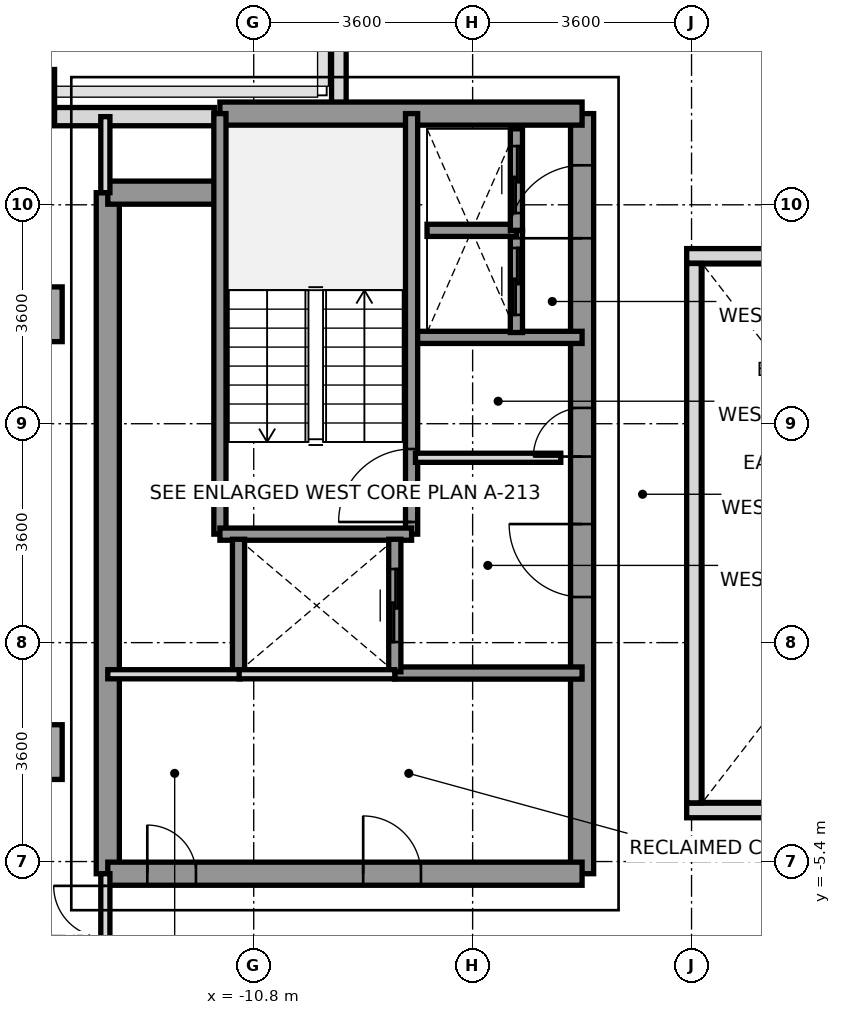
"""IFC4 building model, lengths in metres.
Left out: names, types, materials, properties, quantities, classifications, styles, units other than length and angle.
Written with IfcOpenShell. Run it as: python <this file> out.ifc"""

import sys

from ifc_helpers import new_model, si_unit, direction, frame, frame_2d, origin, origin_2d, place, context, subcontext, project, spatial, rectangle, extrude, source, transform, mapped, element, fill, save


model = new_model("IFC4")
c1 = context("Model", 3, precision=1e-05, world=origin(), true_north=direction((0.0, 1.0)))
c2 = subcontext(c1, "Body", "Model", "MODEL_VIEW")
j1 = project(units=[si_unit("LENGTHUNIT", "METRE"), si_unit("PLANEANGLEUNIT", "RADIAN")], contexts=[c1])
p1 = place(None, origin())
s1 = spatial("IfcSite", under=j1, at=p1, CompositionType="ELEMENT")
p2 = place(p1, origin())
s2 = spatial("IfcBuilding", under=s1, at=p2, CompositionType="ELEMENT")
p3 = place(p2, frame((0.0, 0.0, 211.4)))
s3 = spatial("IfcBuildingStorey", under=s2, at=p3, CompositionType="ELEMENT", Elevation=211.4)
m1 = source(origin(), c2, "Body", "SweptSolid", [
    extrude(rectangle(XDim=0.9, YDim=0.9, at=origin_2d()), origin(), (0.0, 0.0, 1.0), 3.14),
])
for number, where, z_axis, x_axis in (
    (1, (-14.4, -3.6, 0.0), (0.0, 0.0, 1.0), (1.0, 0.0, 0.0)),
    (2, (-14.4, 3.6, 0.0), (0.0, 0.0, 1.0), (1.0, 0.0, 0.0)),
):
    element("IfcColumn", number, at=place(p3, frame(where, z_axis=z_axis, x_axis=x_axis)), inside=s3, PredefinedType="COLUMN", context=c2, shape_type="MappedRepresentation", body=[
        mapped(m1, transform((0.0, 0.0, 0.0), x_axis=(1.0, 0.0, 0.0), y_axis=(0.0, 1.0, 0.0), z_axis=(0.0, 0.0, 1.0), scale=1.0)),
    ])
m2 = source(origin(), c2, "Body", "SweptSolid", [
    extrude(rectangle(XDim=0.65, YDim=0.85, at=origin_2d()), origin(), (0.0, 0.0, 1.0), 3.14),
])
p4 = place(p3, frame((-14.4, 7.2, 0.0), z_axis=(0.0, 0.0, 1.0), x_axis=(1.0, 0.0, 0.0)))
e3 = element("IfcColumn", 3, at=p4, inside=s3, PredefinedType="COLUMN", context=c2, shape_type="MappedRepresentation", body=[
    mapped(m2, transform((0.0, 0.0, 0.0), x_axis=(1.0, 0.0, 0.0), y_axis=(0.0, 1.0, 0.0), z_axis=(0.0, 0.0, 1.0), scale=1.0)),
])
p5 = place(p3, frame((-14.083, 6.85, 0.0), z_axis=(0.0, 0.0, 1.0), x_axis=(1.0, 0.0, 0.0)))
e4 = element("IfcWall", 4, at=p5, inside=s3, PredefinedType="SOLIDWALL", context=c2, shape_type="SweptSolid", body=[
    extrude(rectangle(XDim=2.635, YDim=0.3, at=frame_2d((1.317, 0.0))), origin(), (0.0, 0.0, 1.0), 3.14),
])
p6 = place(p3, frame((-9.4, 6.953, 0.0), z_axis=(0.0, 0.0, 1.0), x_axis=(0.0, 1.0, 0.0)))
e5 = element("IfcWall", 5, at=p6, inside=s3, PredefinedType="PARAPET", context=c2, shape_type="SweptSolid", body=[
    extrude(rectangle(XDim=1.594, YDim=0.24, at=frame_2d((0.797, 0.0))), origin(), (0.0, 0.0, 1.0), 1.15),
])
p7 = place(p3, frame((-13.2, -5.6, 0.0), z_axis=(0.0, 0.0, 1.0), x_axis=(0.0, 1.0, 0.0)))
e6 = element("IfcWall", 6, at=p7, inside=s3, PredefinedType="SHEAR", context=c2, shape_type="SweptSolid", body=[
    extrude(rectangle(XDim=11.2, YDim=0.38, at=frame_2d((5.6, 0.0))), origin(), (0.0, 0.0, 1.0), 3.14),
])
p8 = place(p3, frame((-5.4, -5.6, 0.0), z_axis=(0.0, 0.0, 1.0), x_axis=(0.0, 1.0, 0.0)))
e7 = element("IfcWall", 7, at=p8, inside=s3, PredefinedType="SHEAR", context=c2, shape_type="SweptSolid", body=[
    extrude(rectangle(XDim=12.5, YDim=0.38, at=frame_2d((6.25, 0.0))), origin(), (0.0, 0.0, 1.0), 3.14),
])
p9 = place(p8, frame((4.55, 0.0, 0.0)))
e8 = element("IfcOpeningElement", 8, at=p9, cuts=e7, PredefinedType="OPENING", context=c2, shape_type="SweptSolid", body=[
    extrude(rectangle(XDim=1.2, YDim=2.2, at=frame_2d((0.6, 1.1))), frame((0.0, 0.2, 0.0), z_axis=(0.0, -1.0, 0.0), x_axis=(1.0, 0.0, 0.0)), (0.0, 0.0, 1.0), 0.4),
])
p10 = place(p8, frame((10.45, 0.0, 0.0)))
e9 = element("IfcOpeningElement", 9, at=p10, cuts=e7, PredefinedType="OPENING", context=c2, shape_type="SweptSolid", body=[
    extrude(rectangle(XDim=1.2, YDim=2.2, at=frame_2d((0.6, 1.1))), frame((0.0, 0.2, 0.0), z_axis=(0.0, -1.0, 0.0), x_axis=(1.0, 0.0, 0.0)), (0.0, 0.0, 1.0), 0.4),
])
p11 = place(p8, frame((6.86, 0.0, 0.0)))
e10 = element("IfcOpeningElement", 10, at=p11, cuts=e7, PredefinedType="OPENING", context=c2, shape_type="SweptSolid", body=[
    extrude(rectangle(XDim=0.8, YDim=2.1, at=frame_2d((0.4, 1.05))), frame((0.0, 0.2, 0.0), z_axis=(0.0, -1.0, 0.0), x_axis=(1.0, 0.0, 0.0)), (0.0, 0.0, 1.0), 0.4),
])
p12 = place(p3, frame((-11.356, 6.9, 0.0), z_axis=(0.0, 0.0, 1.0), x_axis=(1.0, 0.0, 0.0)))
e11 = element("IfcWall", 11, at=p12, inside=s3, PredefinedType="SHEAR", context=c2, shape_type="SweptSolid", body=[
    extrude(rectangle(XDim=5.956, YDim=0.38, at=frame_2d((2.978, 0.0))), origin(), (0.0, 0.0, 1.0), 3.14),
])
p13 = place(p3, frame((-13.2, 5.6, 0.0), z_axis=(0.0, 0.0, 1.0), x_axis=(1.0, 0.0, 0.0)))
e12 = element("IfcWall", 12, at=p13, inside=s3, PredefinedType="SHEAR", context=c2, shape_type="SweptSolid", body=[
    extrude(rectangle(XDim=1.844, YDim=0.38, at=frame_2d((0.922, 0.0))), origin(), (0.0, 0.0, 1.0), 3.14),
])
p14 = place(p3, frame((-13.2, -5.6, 0.0), z_axis=(0.0, 0.0, 1.0), x_axis=(1.0, 0.0, 0.0)))
e13 = element("IfcWall", 13, at=p14, inside=s3, PredefinedType="SHEAR", context=c2, shape_type="SweptSolid", body=[
    extrude(rectangle(XDim=7.8, YDim=0.38, at=frame_2d((3.9, 0.0))), origin(), (0.0, 0.0, 1.0), 3.14),
])
p15 = place(p14, frame((0.65, 0.0, 0.0)))
e14 = element("IfcOpeningElement", 14, at=p15, cuts=e13, PredefinedType="OPENING", context=c2, shape_type="SweptSolid", body=[
    extrude(rectangle(XDim=0.8, YDim=2.1, at=frame_2d((0.4, 1.05))), frame((0.0, 0.2, 0.0), z_axis=(0.0, -1.0, 0.0), x_axis=(1.0, 0.0, 0.0)), (0.0, 0.0, 1.0), 0.4),
])
p16 = place(p14, frame((4.2, 0.0, 0.0)))
e15 = element("IfcOpeningElement", 15, at=p16, cuts=e13, PredefinedType="OPENING", context=c2, shape_type="SweptSolid", body=[
    extrude(rectangle(XDim=0.95, YDim=2.15, at=frame_2d((0.475, 1.075))), frame((0.0, 0.2, 0.0), z_axis=(0.0, -1.0, 0.0), x_axis=(1.0, 0.0, 0.0)), (0.0, 0.0, 1.0), 0.4),
])
p17 = place(p3, frame((-8.18, 3.22, 0.0), z_axis=(0.0, 0.0, 1.0), x_axis=(1.0, 0.0, 0.0)))
e16 = element("IfcWall", 16, at=p17, inside=s3, PredefinedType="SOLIDWALL", context=c2, shape_type="SweptSolid", body=[
    extrude(rectangle(XDim=2.78, YDim=0.2, at=frame_2d((1.39, 0.0))), origin(), (0.0, 0.0, 1.0), 3.14),
])
p18 = place(p3, frame((-8.48, -2.3, 0.0), z_axis=(0.0, 0.0, 1.0), x_axis=(1.0, 0.0, 0.0)))
e17 = element("IfcWall", 17, at=p18, inside=s3, PredefinedType="SOLIDWALL", context=c2, shape_type="SweptSolid", body=[
    extrude(rectangle(XDim=3.08, YDim=0.2, at=frame_2d((1.54, 0.0))), origin(), (0.0, 0.0, 1.0), 3.14),
])
p19 = place(p3, frame((-8.204, -0.016, 0.0), z_axis=(0.0, 0.0, 1.0), x_axis=(0.0, 1.0, 0.0)))
e18 = element("IfcWall", 18, at=p19, inside=s3, PredefinedType="SOLIDWALL", context=c2, shape_type="SweptSolid", body=[
    extrude(rectangle(XDim=6.916, YDim=0.2, at=frame_2d((3.458, 0.0))), origin(), (0.0, 0.0, 1.0), 3.14),
])
p20 = place(p19, frame((0.2, 0.0, 0.0)))
e19 = element("IfcOpeningElement", 19, at=p20, cuts=e18, PredefinedType="OPENING", context=c2, shape_type="SweptSolid", body=[
    extrude(rectangle(XDim=1.2, YDim=2.2, at=frame_2d((0.6, 1.1))), frame((0.0, 0.11, 0.0), z_axis=(0.0, -1.0, 0.0), x_axis=(1.0, 0.0, 0.0)), (0.0, 0.0, 1.0), 0.22),
])
p21 = place(p3, frame((-11.356, -0.016, 0.0), z_axis=(0.0, 0.0, 1.0), x_axis=(0.0, 1.0, 0.0)))
e20 = element("IfcWall", 20, at=p21, inside=s3, PredefinedType="SOLIDWALL", context=c2, shape_type="SweptSolid", body=[
    extrude(rectangle(XDim=6.916, YDim=0.2, at=frame_2d((3.458, 0.0))), origin(), (0.0, 0.0, 1.0), 3.14),
])
p22 = place(p3, frame((-11.356, -0.016, 0.0), z_axis=(0.0, 0.0, 1.0), x_axis=(1.0, 0.0, 0.0)))
e21 = element("IfcWall", 21, at=p22, inside=s3, PredefinedType="SOLIDWALL", context=c2, shape_type="SweptSolid", body=[
    extrude(rectangle(XDim=3.152, YDim=0.2, at=frame_2d((1.576, 0.0))), origin(), (0.0, 0.0, 1.0), 3.14),
])
p23 = place(p3, frame((-11.05, -2.28, 0.0), z_axis=(0.0, 0.0, 1.0), x_axis=(0.0, 1.0, 0.0)))
e22 = element("IfcWall", 22, at=p23, inside=s3, PredefinedType="SOLIDWALL", context=c2, shape_type="SweptSolid", body=[
    extrude(rectangle(XDim=2.18, YDim=0.2, at=frame_2d((1.09, 0.0))), origin(), (0.0, 0.0, 1.0), 3.14),
])
p24 = place(p3, frame((-8.48, -2.28, 0.0), z_axis=(0.0, 0.0, 1.0), x_axis=(0.0, 1.0, 0.0)))
e23 = element("IfcWall", 23, at=p24, inside=s3, PredefinedType="SOLIDWALL", context=c2, shape_type="SweptSolid", body=[
    extrude(rectangle(XDim=2.18, YDim=0.2, at=frame_2d((1.09, 0.0))), origin(), (0.0, 0.0, 1.0), 3.14),
])
p25 = place(p24, frame((0.49, 0.0, 0.0)))
e24 = element("IfcOpeningElement", 24, at=p25, cuts=e23, PredefinedType="OPENING", context=c2, shape_type="SweptSolid", body=[
    extrude(rectangle(XDim=1.2, YDim=2.2, at=frame_2d((0.6, 1.1))), frame((0.0, 0.11, 0.0), z_axis=(0.0, -1.0, 0.0), x_axis=(1.0, 0.0, 0.0)), (0.0, 0.0, 1.0), 0.22),
])
p26 = place(p3, frame((-6.48, 3.3, 0.0), z_axis=(0.0, 0.0, 1.0), x_axis=(0.0, 1.0, 0.0)))
e25 = element("IfcWall", 25, at=p26, inside=s3, PredefinedType="SOLIDWALL", context=c2, shape_type="SweptSolid", body=[
    extrude(rectangle(XDim=1.68, YDim=0.2, at=frame_2d((0.84, 0.0))), origin(), (0.0, 0.0, 1.0), 3.14),
])
p27 = place(p26, frame((0.29, 0.0, 0.0)))
e26 = element("IfcOpeningElement", 26, at=p27, cuts=e25, PredefinedType="OPENING", context=c2, shape_type="SweptSolid", body=[
    extrude(rectangle(XDim=1.1, YDim=2.2, at=frame_2d((0.55, 1.1))), frame((0.0, 0.11, 0.0), z_axis=(0.0, -1.0, 0.0), x_axis=(1.0, 0.0, 0.0)), (0.0, 0.0, 1.0), 0.22),
])
p28 = place(p3, frame((-7.95, 4.98, 0.0), z_axis=(0.0, 0.0, 1.0), x_axis=(1.0, 0.0, 0.0)))
e27 = element("IfcWall", 27, at=p28, inside=s3, PredefinedType="SOLIDWALL", context=c2, shape_type="SweptSolid", body=[
    extrude(rectangle(XDim=1.47, YDim=0.2, at=frame_2d((0.735, 0.0))), origin(), (0.0, 0.0, 1.0), 3.14),
])
p29 = place(p3, frame((-6.48, 4.98, 0.0), z_axis=(0.0, 0.0, 1.0), x_axis=(0.0, 1.0, 0.0)))
e28 = element("IfcWall", 28, at=p29, inside=s3, PredefinedType="SOLIDWALL", context=c2, shape_type="SweptSolid", body=[
    extrude(rectangle(XDim=1.67, YDim=0.2, at=frame_2d((0.835, 0.0))), origin(), (0.0, 0.0, 1.0), 3.14),
])
p30 = place(p29, frame((0.285, 0.0, 0.0)))
e29 = element("IfcOpeningElement", 29, at=p30, cuts=e28, PredefinedType="OPENING", context=c2, shape_type="SweptSolid", body=[
    extrude(rectangle(XDim=1.1, YDim=2.2, at=frame_2d((0.55, 1.1))), frame((0.0, 0.11, 0.0), z_axis=(0.0, -1.0, 0.0), x_axis=(1.0, 0.0, 0.0)), (0.0, 0.0, 1.0), 0.22),
])
p31 = place(p3, frame((-8.14, 1.24, 0.0), z_axis=(0.0, 0.0, 1.0), x_axis=(1.0, 0.0, 0.0)))
e30 = element("IfcWall", 30, at=p31, inside=s3, PredefinedType="PARTITIONING", context=c2, shape_type="SweptSolid", body=[
    extrude(rectangle(XDim=2.39, YDim=0.15, at=frame_2d((1.195, 0.0))), origin(), (0.0, 0.0, 1.0), 2.24),
])
p32 = place(p3, frame((-13.2, -2.32, 0.0), z_axis=(0.0, 0.0, 1.0), x_axis=(1.0, 0.0, 0.0)))
e31 = element("IfcWall", 31, at=p32, inside=s3, PredefinedType="PARTITIONING", context=c2, shape_type="SweptSolid", body=[
    extrude(rectangle(XDim=2.18, YDim=0.15, at=frame_2d((1.09, 0.0))), origin(), (0.0, 0.0, 1.0), 3.14),
])
p33 = place(p3, frame((-11.04, -2.32, 0.0), z_axis=(0.0, 0.0, 1.0), x_axis=(1.0, 0.0, 0.0)))
e32 = element("IfcWall", 32, at=p33, inside=s3, PredefinedType="PARTITIONING", context=c2, shape_type="SweptSolid", body=[
    extrude(rectangle(XDim=2.56, YDim=0.15, at=frame_2d((1.28, 0.0))), origin(), (0.0, 0.0, 1.0), 3.14),
])
p34 = place(p3, frame((-13.24, 5.6, 0.0), z_axis=(0.0, 0.0, 1.0), x_axis=(0.0, 1.0, 0.0)))
e33 = element("IfcWall", 33, at=p34, inside=s3, PredefinedType="PARTITIONING", context=c2, shape_type="SweptSolid", body=[
    extrude(rectangle(XDim=1.25, YDim=0.15, at=frame_2d((0.625, 0.0))), origin(), (0.0, 0.0, 1.0), 3.14),
])
p35 = place(p3, frame((-13.24, -6.85, 0.0), z_axis=(0.0, 0.0, 1.0), x_axis=(0.0, 1.0, 0.0)))
e34 = element("IfcWall", 34, at=p35, inside=s3, PredefinedType="PARTITIONING", context=c2, shape_type="SweptSolid", body=[
    extrude(rectangle(XDim=1.25, YDim=0.15, at=frame_2d((0.625, 0.0))), origin(), (0.0, 0.0, 1.0), 3.14),
])
p36 = place(p35, frame((0.2, 0.0, 0.0)))
e35 = element("IfcOpeningElement", 35, at=p36, cuts=e34, PredefinedType="OPENING", context=c2, shape_type="SweptSolid", body=[
    extrude(rectangle(XDim=0.85, YDim=2.1, at=frame_2d((0.425, 1.05))), frame((0.0, 0.085, 0.0), z_axis=(0.0, -1.0, 0.0), x_axis=(1.0, 0.0, 0.0)), (0.0, 0.0, 1.0), 0.17),
])
for number, where, z_axis, x_axis in (
    (36, (-3.68, -4.56, 0.0), (0.0, 0.0, 1.0), (1.0, 0.0, 0.0)),
    (37, (-3.68, 4.56, 0.0), (0.0, 0.0, 1.0), (1.0, 0.0, 0.0)),
):
    element("IfcWall", number, at=place(p3, frame(where, z_axis=z_axis, x_axis=x_axis)), inside=s3, PredefinedType="PARAPET", context=c2, shape_type="SweptSolid", body=[
        extrude(rectangle(XDim=7.36, YDim=0.24, at=frame_2d((3.68, 0.0))), origin(), (0.0, 0.0, 1.0), 1.15),
    ])
p37 = place(p3, frame((-3.56, -4.435, 0.0), z_axis=(0.0, 0.0, 1.0), x_axis=(0.0, 1.0, 0.0)))
e38 = element("IfcWall", 38, at=p37, inside=s3, PredefinedType="PARAPET", context=c2, shape_type="SweptSolid", body=[
    extrude(rectangle(XDim=8.87, YDim=0.24, at=frame_2d((4.435, 0.0))), origin(), (0.0, 0.0, 1.0), 1.15),
])
m3 = source(origin(), c2, "Body", "SweptSolid", [
    extrude(rectangle(XDim=1.2, YDim=2.2, at=frame_2d((0.6, 1.1))), frame((0.0, 0.025, 0.0), z_axis=(0.0, -1.0, 0.0), x_axis=(1.0, 0.0, 0.0)), (0.0, 0.0, 1.0), 0.05),
])
p38 = place(p20, origin())
e39 = element("IfcDoor", 39, at=p38, inside=s3, OperationType="SINGLE_SWING_LEFT", PredefinedType="DOOR", context=c2, shape_type="MappedRepresentation", body=[
    mapped(m3, transform((0.0, 0.0, 0.0), x_axis=(1.0, 0.0, 0.0), y_axis=(0.0, 1.0, 0.0), z_axis=(0.0, 0.0, 1.0), scale=1.0)),
])
fill(e19, e39)
p39 = place(p9, origin())
e40 = element("IfcDoor", 40, at=p39, inside=s3, OperationType="SINGLE_SWING_RIGHT", PredefinedType="DOOR", context=c2, shape_type="MappedRepresentation", body=[
    mapped(m3, transform((0.0, 0.0, 0.0), x_axis=(1.0, 0.0, 0.0), y_axis=(0.0, 1.0, 0.0), z_axis=(0.0, 0.0, 1.0), scale=1.0)),
])
fill(e8, e40)
p40 = place(p10, origin())
e41 = element("IfcDoor", 41, at=p40, inside=s3, OperationType="SINGLE_SWING_LEFT", PredefinedType="DOOR", context=c2, shape_type="MappedRepresentation", body=[
    mapped(m3, transform((0.0, 0.0, 0.0), x_axis=(1.0, 0.0, 0.0), y_axis=(0.0, 1.0, 0.0), z_axis=(0.0, 0.0, 1.0), scale=1.0)),
])
fill(e9, e41)
m4 = source(origin(), c2, "Body", "SweptSolid", [
    extrude(rectangle(XDim=0.8, YDim=2.1, at=frame_2d((0.4, 1.05))), frame((0.0, 0.025, 0.0), z_axis=(0.0, -1.0, 0.0), x_axis=(1.0, 0.0, 0.0)), (0.0, 0.0, 1.0), 0.05),
])
p41 = place(p11, origin())
e42 = element("IfcDoor", 42, at=p41, inside=s3, OperationType="SINGLE_SWING_LEFT", PredefinedType="DOOR", context=c2, shape_type="MappedRepresentation", body=[
    mapped(m4, transform((0.0, 0.0, 0.0), x_axis=(1.0, 0.0, 0.0), y_axis=(0.0, 1.0, 0.0), z_axis=(0.0, 0.0, 1.0), scale=1.0)),
])
fill(e10, e42)
p42 = place(p15, origin())
e43 = element("IfcDoor", 43, at=p42, inside=s3, OperationType="SINGLE_SWING_LEFT", PredefinedType="DOOR", context=c2, shape_type="MappedRepresentation", body=[
    mapped(m4, transform((0.0, 0.0, 0.0), x_axis=(1.0, 0.0, 0.0), y_axis=(0.0, 1.0, 0.0), z_axis=(0.0, 0.0, 1.0), scale=1.0)),
])
fill(e14, e43)
m5 = source(origin(), c2, "Body", "SweptSolid", [
    extrude(rectangle(XDim=0.95, YDim=2.15, at=frame_2d((0.475, 1.075))), frame((0.0, 0.025, 0.0), z_axis=(0.0, -1.0, 0.0), x_axis=(1.0, 0.0, 0.0)), (0.0, 0.0, 1.0), 0.05),
])
p43 = place(p16, origin())
e44 = element("IfcDoor", 44, at=p43, inside=s3, OperationType="SINGLE_SWING_LEFT", PredefinedType="DOOR", context=c2, shape_type="MappedRepresentation", body=[
    mapped(m5, transform((0.0, 0.0, 0.0), x_axis=(1.0, 0.0, 0.0), y_axis=(0.0, 1.0, 0.0), z_axis=(0.0, 0.0, 1.0), scale=1.0)),
])
fill(e15, e44)
p44 = place(p25, origin())
e45 = element("IfcDoor", 45, at=p44, inside=s3, OperationType="SLIDING_TO_RIGHT", PredefinedType="DOOR", context=c2, shape_type="MappedRepresentation", body=[
    mapped(m3, transform((0.0, 0.0, 0.0), x_axis=(1.0, 0.0, 0.0), y_axis=(0.0, 1.0, 0.0), z_axis=(0.0, 0.0, 1.0), scale=1.0)),
])
fill(e24, e45)
m6 = source(origin(), c2, "Body", "SweptSolid", [
    extrude(rectangle(XDim=1.1, YDim=2.2, at=frame_2d((0.55, 1.1))), frame((0.0, 0.025, 0.0), z_axis=(0.0, -1.0, 0.0), x_axis=(1.0, 0.0, 0.0)), (0.0, 0.0, 1.0), 0.05),
])
p45 = place(p27, origin())
e46 = element("IfcDoor", 46, at=p45, inside=s3, OperationType="SLIDING_TO_LEFT", PredefinedType="DOOR", context=c2, shape_type="MappedRepresentation", body=[
    mapped(m6, transform((0.0, 0.0, 0.0), x_axis=(1.0, 0.0, 0.0), y_axis=(0.0, 1.0, 0.0), z_axis=(0.0, 0.0, 1.0), scale=1.0)),
])
fill(e26, e46)
p46 = place(p30, origin())
e47 = element("IfcDoor", 47, at=p46, inside=s3, OperationType="SLIDING_TO_LEFT", PredefinedType="DOOR", context=c2, shape_type="MappedRepresentation", body=[
    mapped(m6, transform((0.0, 0.0, 0.0), x_axis=(1.0, 0.0, 0.0), y_axis=(0.0, 1.0, 0.0), z_axis=(0.0, 0.0, 1.0), scale=1.0)),
])
fill(e29, e47)
m7 = source(origin(), c2, "Body", "SweptSolid", [
    extrude(rectangle(XDim=0.85, YDim=2.1, at=frame_2d((0.425, 1.05))), frame((0.0, 0.025, 0.0), z_axis=(0.0, -1.0, 0.0), x_axis=(1.0, 0.0, 0.0)), (0.0, 0.0, 1.0), 0.05),
])
p47 = place(p36, origin())
e48 = element("IfcDoor", 48, at=p47, inside=s3, OperationType="SINGLE_SWING_RIGHT", PredefinedType="DOOR", context=c2, shape_type="MappedRepresentation", body=[
    mapped(m7, transform((0.0, 0.0, 0.0), x_axis=(1.0, 0.0, 0.0), y_axis=(0.0, 1.0, 0.0), z_axis=(0.0, 0.0, 1.0), scale=1.0)),
])
fill(e35, e48)
save(model, sys.argv[1])
